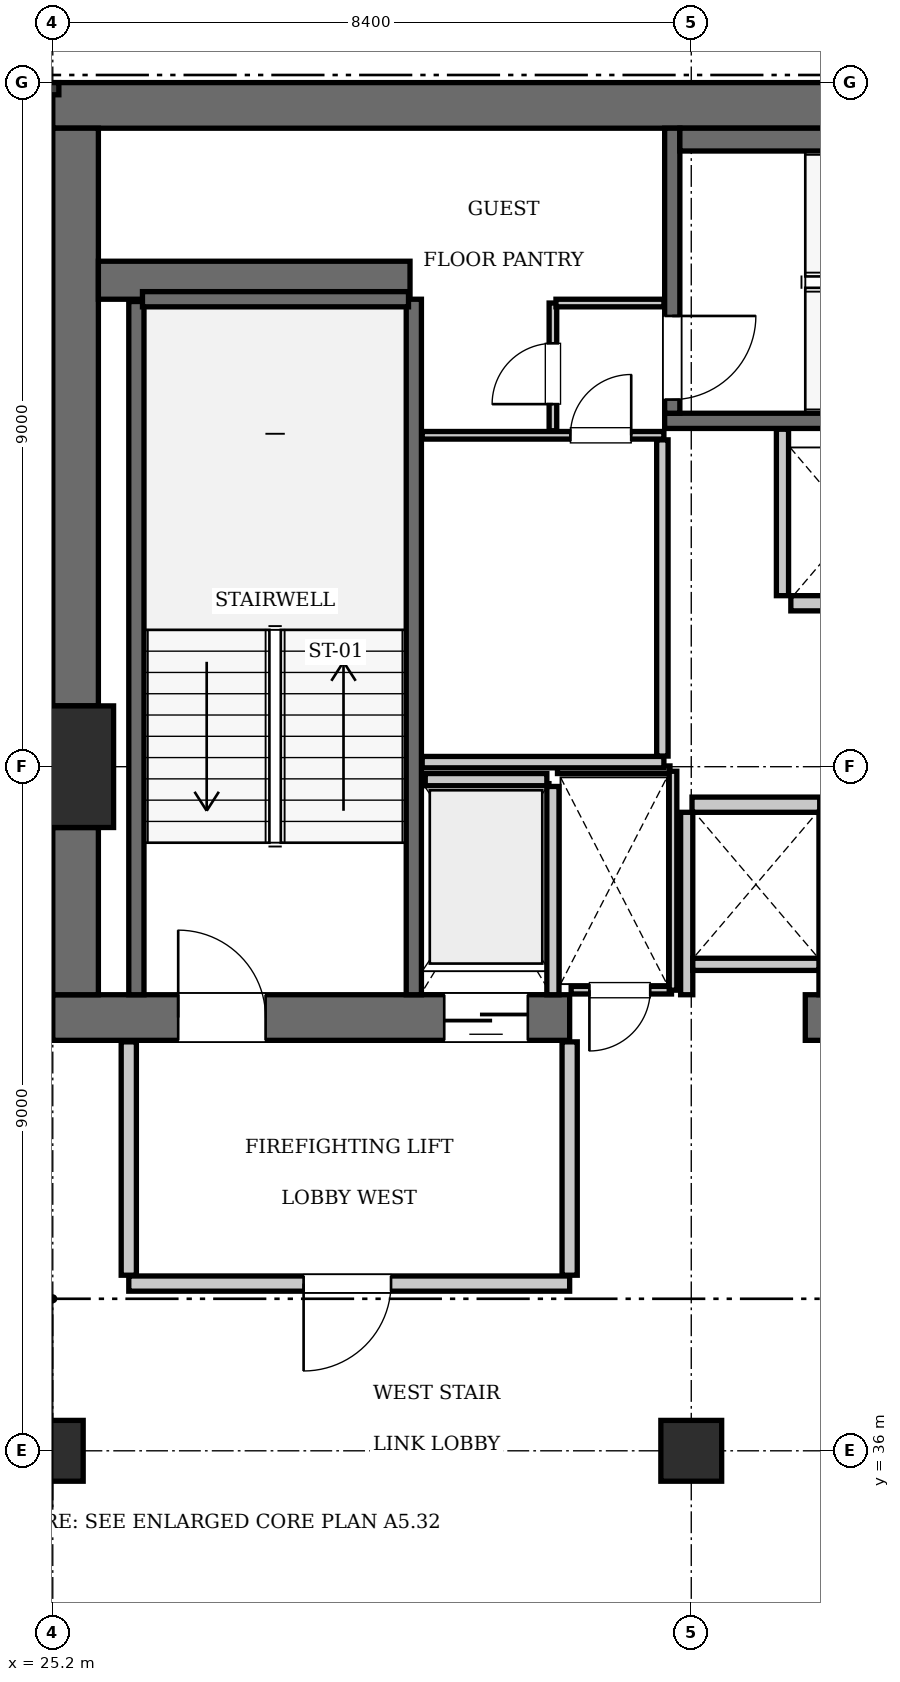
"""IFC4 building model, lengths in metres.
Left out: names, types, materials, properties, quantities, classifications, styles, units other than length and angle.
Written with IfcOpenShell. Run it as: python <this file> out.ifc"""

import sys

from ifc_helpers import new_model, si_unit, direction, frame, frame_2d, origin, origin_2d, place, context, subcontext, project, spatial, rectangle, extrude, element, fill, save


model = new_model("IFC4")
c1 = context("Model", 3, precision=1e-05, world=origin(), true_north=direction((0.0, 1.0)))
c2 = subcontext(c1, "Body", "Model", "MODEL_VIEW")
j1 = project(units=[si_unit("LENGTHUNIT", "METRE"), si_unit("PLANEANGLEUNIT", "RADIAN")], contexts=[c1])
p1 = place(None, origin())
s1 = spatial("IfcSite", under=j1, at=p1, CompositionType="ELEMENT")
p2 = place(p1, origin())
s2 = spatial("IfcBuilding", under=s1, at=p2, CompositionType="ELEMENT")
p3 = place(p2, frame((0.0, 0.0, 274.05)))
s3 = spatial("IfcBuildingStorey", under=s2, at=p3, CompositionType="ELEMENT", Elevation=274.05)
p4 = place(p3, frame((25.2, 45.0, 0.0), z_axis=(0.0, 0.0, 1.0), x_axis=(1.0, 0.0, 0.0)))
e1 = element("IfcColumn", 1, at=p4, inside=s3, PredefinedType="COLUMN", context=c2, shape_type="SweptSolid", body=[
    extrude(rectangle(XDim=1.6, YDim=1.6, at=origin_2d()), origin(), (0.0, 0.0, 1.0), 3.85),
])
p5 = place(p3, frame((25.2, 53.7, 0.0), z_axis=(0.0, 0.0, 1.0), x_axis=(1.0, 0.0, 0.0)))
e2 = element("IfcWall", 2, at=p5, inside=s3, PredefinedType="SHEAR", context=c2, shape_type="SweptSolid", body=[
    extrude(rectangle(XDim=25.2, YDim=0.6, at=frame_2d((12.6, 0.0))), origin(), (0.0, 0.0, 1.0), 3.85),
])
p6 = place(p3, frame((25.2, 41.7, 0.0), z_axis=(0.0, 0.0, 1.0), x_axis=(1.0, 0.0, 0.0)))
e3 = element("IfcWall", 3, at=p6, inside=s3, PredefinedType="SHEAR", context=c2, shape_type="SweptSolid", body=[
    extrude(rectangle(XDim=6.8, YDim=0.6, at=frame_2d((3.4, 0.0))), origin(), (0.0, 0.0, 1.0), 3.85),
])
p7 = place(p6, frame((1.65, 0.0, 0.0)))
e4 = element("IfcOpeningElement", 4, at=p7, cuts=e3, PredefinedType="OPENING", context=c2, shape_type="SweptSolid", body=[
    extrude(rectangle(XDim=1.15, YDim=2.15, at=frame_2d((0.575, 1.075))), frame((0.0, 0.31, 0.0), z_axis=(0.0, -1.0, 0.0), x_axis=(1.0, 0.0, 0.0)), (0.0, 0.0, 1.0), 0.62),
])
p8 = place(p6, frame((5.15, 0.0, 0.0)))
e5 = element("IfcOpeningElement", 5, at=p8, cuts=e3, PredefinedType="OPENING", context=c2, shape_type="SweptSolid", body=[
    extrude(rectangle(XDim=1.1, YDim=2.2, at=frame_2d((0.55, 1.1))), frame((0.0, 0.31, 0.0), z_axis=(0.0, -1.0, 0.0), x_axis=(1.0, 0.0, 0.0)), (0.0, 0.0, 1.0), 0.62),
])
p9 = place(p3, frame((35.1, 41.7, 0.0), z_axis=(0.0, 0.0, 1.0), x_axis=(1.0, 0.0, 0.0)))
e6 = element("IfcWall", 6, at=p9, inside=s3, PredefinedType="SHEAR", context=c2, shape_type="SweptSolid", body=[
    extrude(rectangle(XDim=5.4, YDim=0.6, at=frame_2d((2.7, 0.0))), origin(), (0.0, 0.0, 1.0), 3.85),
])
p10 = place(p3, frame((25.5, 42.0, 0.0), z_axis=(0.0, 0.0, 1.0), x_axis=(0.0, 1.0, 0.0)))
e7 = element("IfcWall", 7, at=p10, inside=s3, PredefinedType="SHEAR", context=c2, shape_type="SweptSolid", body=[
    extrude(rectangle(XDim=2.2, YDim=0.6, at=frame_2d((1.1, 0.0))), origin(), (0.0, 0.0, 1.0), 3.85),
])
p11 = place(p3, frame((25.5, 45.8, 0.0), z_axis=(0.0, 0.0, 1.0), x_axis=(0.0, 1.0, 0.0)))
e8 = element("IfcWall", 8, at=p11, inside=s3, PredefinedType="SHEAR", context=c2, shape_type="SweptSolid", body=[
    extrude(rectangle(XDim=7.6, YDim=0.6, at=frame_2d((3.8, 0.0))), origin(), (0.0, 0.0, 1.0), 3.85),
])
p12 = place(p3, frame((25.8, 51.4, 0.0), z_axis=(0.0, 0.0, 1.0), x_axis=(1.0, 0.0, 0.0)))
e9 = element("IfcWall", 9, at=p12, inside=s3, PredefinedType="SHEAR", context=c2, shape_type="SweptSolid", body=[
    extrude(rectangle(XDim=4.1, YDim=0.5, at=frame_2d((2.05, 0.0))), origin(), (0.0, 0.0, 1.0), 3.85),
])
for number, where, z_axis, x_axis in (
    (10, (25.2, 36.0, 0.0), (0.0, 0.0, 1.0), (1.0, 0.0, 0.0)),
    (11, (33.6, 36.0, 0.0), (0.0, 0.0, 1.0), (1.0, 0.0, 0.0)),
):
    element("IfcColumn", number, at=place(p3, frame(where, z_axis=z_axis, x_axis=x_axis)), inside=s3, PredefinedType="COLUMN", context=c2, shape_type="SweptSolid", body=[
        extrude(rectangle(XDim=0.8, YDim=0.8, at=origin_2d()), origin(), (0.0, 0.0, 1.0), 3.85),
    ])
p13 = place(p3, frame((29.95, 42.0, 0.0), z_axis=(0.0, 0.0, 1.0), x_axis=(0.0, 1.0, 0.0)))
e12 = element("IfcWall", 12, at=p13, inside=s3, PredefinedType="SOLIDWALL", context=c2, shape_type="SweptSolid", body=[
    extrude(rectangle(XDim=9.15, YDim=0.2, at=frame_2d((4.575, 0.0))), origin(), (0.0, 0.0, 1.0), 3.61),
])
p14 = place(p3, frame((26.3, 42.0, 0.0), z_axis=(0.0, 0.0, 1.0), x_axis=(0.0, 1.0, 0.0)))
e13 = element("IfcWall", 13, at=p14, inside=s3, PredefinedType="SOLIDWALL", context=c2, shape_type="SweptSolid", body=[
    extrude(rectangle(XDim=9.12, YDim=0.2, at=frame_2d((4.56, 0.0))), origin(), (0.0, 0.0, 1.0), 3.61),
])
p15 = place(p3, frame((26.38, 51.15, 0.0), z_axis=(0.0, 0.0, 1.0), x_axis=(1.0, 0.0, 0.0)))
e14 = element("IfcWall", 14, at=p15, inside=s3, PredefinedType="SOLIDWALL", context=c2, shape_type="SweptSolid", body=[
    extrude(rectangle(XDim=3.5, YDim=0.2, at=frame_2d((1.75, 0.0))), origin(), (0.0, 0.0, 1.0), 3.61),
])
p16 = place(p3, frame((33.25, 49.55, 0.0), z_axis=(0.0, 0.0, 1.0), x_axis=(1.0, 0.0, 0.0)))
e15 = element("IfcWall", 15, at=p16, inside=s3, PredefinedType="SOLIDWALL", context=c2, shape_type="SweptSolid", body=[
    extrude(rectangle(XDim=9.1, YDim=0.2, at=frame_2d((4.55, 0.0))), origin(), (0.0, 0.0, 1.0), 3.61),
])
p17 = place(p3, frame((33.35, 49.65, 0.0), z_axis=(0.0, 0.0, 1.0), x_axis=(0.0, 1.0, 0.0)))
e16 = element("IfcWall", 16, at=p17, inside=s3, PredefinedType="SOLIDWALL", context=c2, shape_type="SweptSolid", body=[
    extrude(rectangle(XDim=3.75, YDim=0.2, at=frame_2d((1.875, 0.0))), origin(), (0.0, 0.0, 1.0), 3.61),
])
p18 = place(p17, frame((0.18, 0.0, 0.0)))
e17 = element("IfcOpeningElement", 17, at=p18, cuts=e16, PredefinedType="OPENING", context=c2, shape_type="SweptSolid", body=[
    extrude(rectangle(XDim=1.1, YDim=2.15, at=frame_2d((0.55, 1.075))), frame((0.0, 0.11, 0.0), z_axis=(0.0, -1.0, 0.0), x_axis=(1.0, 0.0, 0.0)), (0.0, 0.0, 1.0), 0.22),
])
p19 = place(p3, frame((33.45, 53.25, 0.0), z_axis=(0.0, 0.0, 1.0), x_axis=(1.0, 0.0, 0.0)))
e18 = element("IfcWall", 18, at=p19, inside=s3, PredefinedType="SOLIDWALL", context=c2, shape_type="SweptSolid", body=[
    extrude(rectangle(XDim=8.7, YDim=0.3, at=frame_2d((4.35, 0.0))), origin(), (0.0, 0.0, 1.0), 3.61),
])
p20 = place(p3, frame((34.91, 47.15, 0.0), z_axis=(0.0, 0.0, 1.0), x_axis=(1.0, 0.0, 0.0)))
e19 = element("IfcWall", 19, at=p20, inside=s3, PredefinedType="SOLIDWALL", context=c2, shape_type="SweptSolid", body=[
    extrude(rectangle(XDim=1.68, YDim=0.2, at=frame_2d((0.84, 0.0))), origin(), (0.0, 0.0, 1.0), 3.61),
])
p21 = place(p3, frame((33.61, 44.5, 0.0), z_axis=(0.0, 0.0, 1.0), x_axis=(1.0, 0.0, 0.0)))
e20 = element("IfcWall", 20, at=p21, inside=s3, PredefinedType="SOLIDWALL", context=c2, shape_type="SweptSolid", body=[
    extrude(rectangle(XDim=1.68, YDim=0.2, at=frame_2d((0.84, 0.0))), origin(), (0.0, 0.0, 1.0), 3.61),
])
p22 = place(p3, frame((30.1, 44.83, 0.0), z_axis=(0.0, 0.0, 1.0), x_axis=(1.0, 0.0, 0.0)))
e21 = element("IfcWall", 21, at=p22, inside=s3, PredefinedType="SOLIDWALL", context=c2, shape_type="SweptSolid", body=[
    extrude(rectangle(XDim=1.6, YDim=0.16, at=frame_2d((0.8, 0.0))), origin(), (0.0, 0.0, 1.0), 3.61),
])
p23 = place(p3, frame((31.78, 42.0, 0.0), z_axis=(0.0, 0.0, 1.0), x_axis=(0.0, 1.0, 0.0)))
e22 = element("IfcWall", 22, at=p23, inside=s3, PredefinedType="SOLIDWALL", context=c2, shape_type="SweptSolid", body=[
    extrude(rectangle(XDim=2.74, YDim=0.16, at=frame_2d((1.37, 0.0))), origin(), (0.0, 0.0, 1.0), 3.61),
])
p24 = place(p3, frame((34.8, 47.25, 0.0), z_axis=(0.0, 0.0, 1.0), x_axis=(0.0, 1.0, 0.0)))
e23 = element("IfcWall", 23, at=p24, inside=s3, PredefinedType="SOLIDWALL", context=c2, shape_type="SweptSolid", body=[
    extrude(rectangle(XDim=2.19, YDim=0.16, at=frame_2d((1.095, 0.0))), origin(), (0.0, 0.0, 1.0), 3.61),
])
for number, where, z_axis, x_axis in (
    (24, (33.54, 42.0, 0.0), (0.0, 0.0, 1.0), (0.0, 1.0, 0.0)),
    (25, (35.36, 42.0, 0.0), (0.0, 0.0, 1.0), (0.0, 1.0, 0.0)),
):
    element("IfcWall", number, at=place(p3, frame(where, z_axis=z_axis, x_axis=x_axis)), inside=s3, PredefinedType="SOLIDWALL", context=c2, shape_type="SweptSolid", body=[
        extrude(rectangle(XDim=2.4, YDim=0.16, at=frame_2d((1.2, 0.0))), origin(), (0.0, 0.0, 1.0), 3.61),
    ])
p25 = place(p3, frame((33.62, 42.4, 0.0), z_axis=(0.0, 0.0, 1.0), x_axis=(1.0, 0.0, 0.0)))
e26 = element("IfcWall", 26, at=p25, inside=s3, PredefinedType="SOLIDWALL", context=c2, shape_type="SweptSolid", body=[
    extrude(rectangle(XDim=1.66, YDim=0.16, at=frame_2d((0.83, 0.0))), origin(), (0.0, 0.0, 1.0), 3.61),
])
p26 = place(p3, frame((26.2, 38.2, 0.0), z_axis=(0.0, 0.0, 1.0), x_axis=(1.0, 0.0, 0.0)))
e27 = element("IfcWall", 27, at=p26, inside=s3, PredefinedType="PARTITIONING", context=c2, shape_type="SweptSolid", body=[
    extrude(rectangle(XDim=5.8, YDim=0.2, at=frame_2d((2.9, 0.0))), origin(), (0.0, 0.0, 1.0), 3.61),
])
p27 = place(p26, frame((2.3, 0.0, 0.0)))
e28 = element("IfcOpeningElement", 28, at=p27, cuts=e27, PredefinedType="OPENING", context=c2, shape_type="SweptSolid", body=[
    extrude(rectangle(XDim=1.15, YDim=2.15, at=frame_2d((0.575, 1.075))), frame((0.0, 0.11, 0.0), z_axis=(0.0, -1.0, 0.0), x_axis=(1.0, 0.0, 0.0)), (0.0, 0.0, 1.0), 0.22),
])
for number, where, z_axis, x_axis in (
    (29, (26.2, 38.31, 0.0), (0.0, 0.0, 1.0), (0.0, 1.0, 0.0)),
    (30, (32.0, 38.31, 0.0), (0.0, 0.0, 1.0), (0.0, 1.0, 0.0)),
):
    element("IfcWall", number, at=place(p3, frame(where, z_axis=z_axis, x_axis=x_axis)), inside=s3, PredefinedType="PARTITIONING", context=c2, shape_type="SweptSolid", body=[
        extrude(rectangle(XDim=3.07, YDim=0.2, at=frame_2d((1.535, 0.0))), origin(), (0.0, 0.0, 1.0), 3.61),
    ])
p28 = place(p3, frame((32.02, 42.06, 0.0), z_axis=(0.0, 0.0, 1.0), x_axis=(1.0, 0.0, 0.0)))
e31 = element("IfcWall", 31, at=p28, inside=s3, PredefinedType="PARTITIONING", context=c2, shape_type="SweptSolid", body=[
    extrude(rectangle(XDim=1.32, YDim=0.1, at=frame_2d((0.66, 0.0))), origin(), (0.0, 0.0, 1.0), 3.61),
])
p29 = place(p28, frame((0.24, 0.0, 0.0)))
e32 = element("IfcOpeningElement", 32, at=p29, cuts=e31, PredefinedType="OPENING", context=c2, shape_type="SweptSolid", body=[
    extrude(rectangle(XDim=0.8, YDim=2.05, at=frame_2d((0.4, 1.025))), frame((0.0, 0.06, 0.0), z_axis=(0.0, -1.0, 0.0), x_axis=(1.0, 0.0, 0.0)), (0.0, 0.0, 1.0), 0.12),
])
p30 = place(p3, frame((31.84, 44.96, 0.0), z_axis=(0.0, 0.0, 1.0), x_axis=(1.0, 0.0, 0.0)))
e33 = element("IfcWall", 33, at=p30, inside=s3, PredefinedType="PARTITIONING", context=c2, shape_type="SweptSolid", body=[
    extrude(rectangle(XDim=1.48, YDim=0.1, at=frame_2d((0.74, 0.0))), origin(), (0.0, 0.0, 1.0), 3.61),
])
p31 = place(p3, frame((33.36, 42.06, 0.0), z_axis=(0.0, 0.0, 1.0), x_axis=(0.0, 1.0, 0.0)))
e34 = element("IfcWall", 34, at=p31, inside=s3, PredefinedType="PARTITIONING", context=c2, shape_type="SweptSolid", body=[
    extrude(rectangle(XDim=2.88, YDim=0.1, at=frame_2d((1.44, 0.0))), origin(), (0.0, 0.0, 1.0), 3.61),
])
p32 = place(p3, frame((30.06, 45.06, 0.0), z_axis=(0.0, 0.0, 1.0), x_axis=(1.0, 0.0, 0.0)))
e35 = element("IfcWall", 35, at=p32, inside=s3, PredefinedType="PARTITIONING", context=c2, shape_type="SweptSolid", body=[
    extrude(rectangle(XDim=3.18, YDim=0.15, at=frame_2d((1.59, 0.0))), origin(), (0.0, 0.0, 1.0), 3.61),
])
p33 = place(p3, frame((33.22, 45.14, 0.0), z_axis=(0.0, 0.0, 1.0), x_axis=(0.0, 1.0, 0.0)))
e36 = element("IfcWall", 36, at=p33, inside=s3, PredefinedType="PARTITIONING", context=c2, shape_type="SweptSolid", body=[
    extrude(rectangle(XDim=4.16, YDim=0.15, at=frame_2d((2.08, 0.0))), origin(), (0.0, 0.0, 1.0), 3.61),
])
p34 = place(p3, frame((30.06, 49.36, 0.0), z_axis=(0.0, 0.0, 1.0), x_axis=(1.0, 0.0, 0.0)))
e37 = element("IfcWall", 37, at=p34, inside=s3, PredefinedType="PARTITIONING", context=c2, shape_type="SweptSolid", body=[
    extrude(rectangle(XDim=3.18, YDim=0.1, at=frame_2d((1.59, 0.0))), origin(), (0.0, 0.0, 1.0), 3.61),
])
p35 = place(p34, frame((1.95, 0.0, 0.0)))
e38 = element("IfcOpeningElement", 38, at=p35, cuts=e37, PredefinedType="OPENING", context=c2, shape_type="SweptSolid", body=[
    extrude(rectangle(XDim=0.8, YDim=2.05, at=frame_2d((0.4, 1.025))), frame((0.0, 0.06, 0.0), z_axis=(0.0, -1.0, 0.0), x_axis=(1.0, 0.0, 0.0)), (0.0, 0.0, 1.0), 0.12),
])
p36 = place(p3, frame((31.78, 49.42, 0.0), z_axis=(0.0, 0.0, 1.0), x_axis=(0.0, 1.0, 0.0)))
e39 = element("IfcWall", 39, at=p36, inside=s3, PredefinedType="PARTITIONING", context=c2, shape_type="SweptSolid", body=[
    extrude(rectangle(XDim=1.68, YDim=0.1, at=frame_2d((0.84, 0.0))), origin(), (0.0, 0.0, 1.0), 3.61),
])
p37 = place(p36, frame((0.35, 0.0, 0.0)))
e40 = element("IfcOpeningElement", 40, at=p37, cuts=e39, PredefinedType="OPENING", context=c2, shape_type="SweptSolid", body=[
    extrude(rectangle(XDim=0.8, YDim=2.05, at=frame_2d((0.4, 1.025))), frame((0.0, 0.06, 0.0), z_axis=(0.0, -1.0, 0.0), x_axis=(1.0, 0.0, 0.0)), (0.0, 0.0, 1.0), 0.12),
])
p38 = place(p3, frame((31.82, 51.1, 0.0), z_axis=(0.0, 0.0, 1.0), x_axis=(1.0, 0.0, 0.0)))
e41 = element("IfcWall", 41, at=p38, inside=s3, PredefinedType="PARTITIONING", context=c2, shape_type="SweptSolid", body=[
    extrude(rectangle(XDim=1.42, YDim=0.1, at=frame_2d((0.71, 0.0))), origin(), (0.0, 0.0, 1.0), 3.61),
])
p39 = place(p7, origin())
e42 = element("IfcDoor", 42, at=p39, inside=s3, OperationType="SINGLE_SWING_LEFT", PredefinedType="DOOR", context=c2, shape_type="SweptSolid", body=[
    extrude(rectangle(XDim=1.15, YDim=2.15, at=frame_2d((0.575, 1.075))), frame((0.0, 0.025, 0.0), z_axis=(0.0, -1.0, 0.0), x_axis=(1.0, 0.0, 0.0)), (0.0, 0.0, 1.0), 0.05),
])
fill(e4, e42)
p40 = place(p18, frame((1.1, 0.0, 0.0), z_axis=(0.0, 0.0, 1.0), x_axis=(-1.0, 0.0, 0.0)))
e43 = element("IfcDoor", 43, at=p40, inside=s3, OperationType="SINGLE_SWING_LEFT", PredefinedType="DOOR", context=c2, shape_type="SweptSolid", body=[
    extrude(rectangle(XDim=1.1, YDim=2.15, at=frame_2d((0.55, 1.075))), frame((0.0, 0.025, 0.0), z_axis=(0.0, -1.0, 0.0), x_axis=(1.0, 0.0, 0.0)), (0.0, 0.0, 1.0), 0.05),
])
fill(e17, e43)
p41 = place(p8, frame((1.1, 0.0, 0.0), z_axis=(0.0, 0.0, 1.0), x_axis=(-1.0, 0.0, 0.0)))
e44 = element("IfcDoor", 44, at=p41, inside=s3, OperationType="SLIDING_TO_LEFT", PredefinedType="DOOR", context=c2, shape_type="SweptSolid", body=[
    extrude(rectangle(XDim=1.1, YDim=2.2, at=frame_2d((0.55, 1.1))), frame((0.0, 0.025, 0.0), z_axis=(0.0, -1.0, 0.0), x_axis=(1.0, 0.0, 0.0)), (0.0, 0.0, 1.0), 0.05),
])
fill(e5, e44)
p42 = place(p27, frame((1.15, 0.0, 0.0), z_axis=(0.0, 0.0, 1.0), x_axis=(-1.0, 0.0, 0.0)))
e45 = element("IfcDoor", 45, at=p42, inside=s3, OperationType="SINGLE_SWING_RIGHT", PredefinedType="DOOR", context=c2, shape_type="SweptSolid", body=[
    extrude(rectangle(XDim=1.15, YDim=2.15, at=frame_2d((0.575, 1.075))), frame((0.0, 0.025, 0.0), z_axis=(0.0, -1.0, 0.0), x_axis=(1.0, 0.0, 0.0)), (0.0, 0.0, 1.0), 0.05),
])
fill(e28, e45)
p43 = place(p29, frame((0.8, 0.0, 0.0), z_axis=(0.0, 0.0, 1.0), x_axis=(-1.0, 0.0, 0.0)))
e46 = element("IfcDoor", 46, at=p43, inside=s3, OperationType="SINGLE_SWING_RIGHT", PredefinedType="DOOR", context=c2, shape_type="SweptSolid", body=[
    extrude(rectangle(XDim=0.8, YDim=2.05, at=frame_2d((0.4, 1.025))), frame((0.0, 0.025, 0.0), z_axis=(0.0, -1.0, 0.0), x_axis=(1.0, 0.0, 0.0)), (0.0, 0.0, 1.0), 0.05),
])
fill(e32, e46)
p44 = place(p35, origin())
e47 = element("IfcDoor", 47, at=p44, inside=s3, OperationType="SINGLE_SWING_RIGHT", PredefinedType="DOOR", context=c2, shape_type="SweptSolid", body=[
    extrude(rectangle(XDim=0.8, YDim=2.05, at=frame_2d((0.4, 1.025))), frame((0.0, 0.025, 0.0), z_axis=(0.0, -1.0, 0.0), x_axis=(1.0, 0.0, 0.0)), (0.0, 0.0, 1.0), 0.05),
])
fill(e38, e47)
p45 = place(p37, origin())
e48 = element("IfcDoor", 48, at=p45, inside=s3, OperationType="SINGLE_SWING_LEFT", PredefinedType="DOOR", context=c2, shape_type="SweptSolid", body=[
    extrude(rectangle(XDim=0.8, YDim=2.05, at=frame_2d((0.4, 1.025))), frame((0.0, 0.025, 0.0), z_axis=(0.0, -1.0, 0.0), x_axis=(1.0, 0.0, 0.0)), (0.0, 0.0, 1.0), 0.05),
])
fill(e40, e48)
save(model, sys.argv[1])
